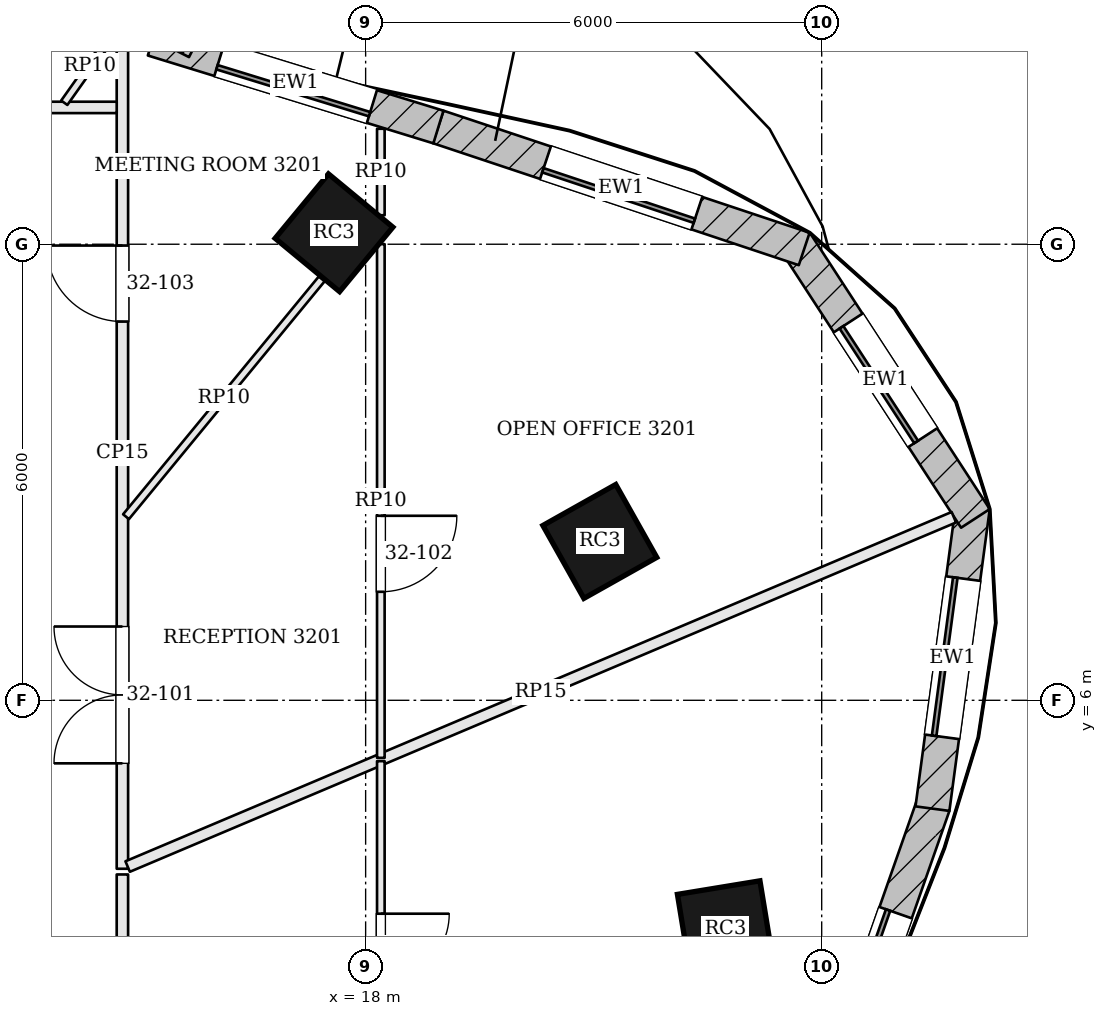
"""IFC4 building model, lengths in metres.
Left out: names, types, materials, properties, quantities, classifications, styles, units other than length and angle.
Written with IfcOpenShell. Run it as: python <this file> out.ifc"""

import sys

from ifc_helpers import new_model, si_unit, direction, frame, frame_2d, origin, origin_2d, place, context, subcontext, project, spatial, rectangle, extrude, element, fill, save


model = new_model("IFC4")
c1 = context("Model", 3, precision=1e-05, world=origin(), true_north=direction((0.0, 1.0)))
c2 = subcontext(c1, "Body", "Model", "MODEL_VIEW")
j1 = project(units=[si_unit("LENGTHUNIT", "METRE"), si_unit("PLANEANGLEUNIT", "RADIAN")], contexts=[c1])
p1 = place(None, origin())
s1 = spatial("IfcSite", under=j1, at=p1, CompositionType="ELEMENT")
p2 = place(p1, origin())
s2 = spatial("IfcBuilding", under=s1, at=p2, CompositionType="ELEMENT")
p3 = place(p2, frame((0.0, 0.0, 134.4)))
s3 = spatial("IfcBuildingStorey", under=s2, at=p3, CompositionType="ELEMENT", Elevation=134.4)
for number, where, z_axis, x_axis in (
    (1, (22.734, 2.993, 0.0), (0.0, 0.0, 1.0), (-0.162, 0.987, 0.0)),
    (2, (21.081, 8.09, 0.0), (0.0, 0.0, 1.0), (-0.49, 0.872, 0.0)),
    (3, (17.584, 12.151, 0.0), (0.0, 0.0, 1.0), (-0.771, 0.637, 0.0)),
):
    element("IfcColumn", number, at=place(p3, frame(where, z_axis=z_axis, x_axis=x_axis)), inside=s3, PredefinedType="COLUMN", context=c2, shape_type="SweptSolid", body=[
        extrude(rectangle(XDim=1.1, YDim=1.1, at=origin_2d()), origin(), (0.0, 0.0, 1.0), 3.9),
    ])
p4 = place(p3, frame((23.782, -0.189, 0.0), z_axis=(0.0, 0.0, 1.0), x_axis=(0.330794307703, 0.943702880144, 0.0)))
e4 = element("IfcWall", 4, at=p4, inside=s3, PredefinedType="SOLIDWALL", context=c2, shape_type="SweptSolid", body=[
    extrude(rectangle(XDim=5.095, YDim=0.45, at=frame_2d((2.548, 0.0))), origin(), (0.0, 0.0, 1.0), 3.7),
])
p5 = place(p4, frame((1.498, 0.0, 0.9)))
e5 = element("IfcOpeningElement", 5, at=p5, cuts=e4, PredefinedType="OPENING", context=c2, shape_type="SweptSolid", body=[
    extrude(rectangle(XDim=2.1, YDim=2.3, at=frame_2d((1.05, 1.15))), frame((0.0, 0.235, 0.0), z_axis=(0.0, -1.0, 0.0), x_axis=(1.0, 0.0, 0.0)), (0.0, 0.0, 1.0), 0.47),
])
p6 = place(p3, frame((25.457, 4.575, 0.0), z_axis=(0.0, 0.0, 1.0), x_axis=(0.132475046402, 0.991186340746, 0.0)))
e6 = element("IfcWall", 6, at=p6, inside=s3, PredefinedType="SOLIDWALL", context=c2, shape_type="SweptSolid", body=[
    extrude(rectangle(XDim=4.007, YDim=0.45, at=frame_2d((2.003, 0.0))), origin(), (0.0, 0.0, 1.0), 3.7),
])
p7 = place(p6, frame((0.953, 0.0, 0.9)))
e7 = element("IfcOpeningElement", 7, at=p7, cuts=e6, PredefinedType="OPENING", context=c2, shape_type="SweptSolid", body=[
    extrude(rectangle(XDim=2.1, YDim=2.3, at=frame_2d((1.05, 1.15))), frame((0.0, 0.235, 0.0), z_axis=(0.0, -1.0, 0.0), x_axis=(1.0, 0.0, 0.0)), (0.0, 0.0, 1.0), 0.47),
])
p8 = place(p3, frame((26.022, 8.393, 0.0), z_axis=(0.0, 0.0, 1.0), x_axis=(-0.545637310328, 0.838021435035, 0.0)))
e8 = element("IfcWall", 8, at=p8, inside=s3, PredefinedType="SOLIDWALL", context=c2, shape_type="SweptSolid", body=[
    extrude(rectangle(XDim=4.336, YDim=0.45, at=frame_2d((2.168, 0.0))), origin(), (0.0, 0.0, 1.0), 3.7),
])
p9 = place(p8, frame((1.268, 0.0, 0.9)))
e9 = element("IfcOpeningElement", 9, at=p9, cuts=e8, PredefinedType="OPENING", context=c2, shape_type="SweptSolid", body=[
    extrude(rectangle(XDim=1.8, YDim=2.3, at=frame_2d((0.9, 1.15))), frame((0.0, 0.235, 0.0), z_axis=(0.0, -1.0, 0.0), x_axis=(1.0, 0.0, 0.0)), (0.0, 0.0, 1.0), 0.47),
])
p10 = place(p3, frame((23.77, 11.938, 0.0), z_axis=(0.0, 0.0, 1.0), x_axis=(-0.948673679101, 0.316256621402, 0.0)))
e10 = element("IfcWall", 10, at=p10, inside=s3, PredefinedType="SOLIDWALL", context=c2, shape_type="SweptSolid", body=[
    extrude(rectangle(XDim=5.076, YDim=0.45, at=frame_2d((2.538, 0.0))), origin(), (0.0, 0.0, 1.0), 3.7),
])
p11 = place(p10, frame((1.488, 0.0, 0.9)))
e11 = element("IfcOpeningElement", 11, at=p11, cuts=e10, PredefinedType="OPENING", context=c2, shape_type="SweptSolid", body=[
    extrude(rectangle(XDim=2.1, YDim=2.3, at=frame_2d((1.05, 1.15))), frame((0.0, 0.235, 0.0), z_axis=(0.0, -1.0, 0.0), x_axis=(1.0, 0.0, 0.0)), (0.0, 0.0, 1.0), 0.47),
])
p12 = place(p3, frame((18.958, 13.542, 0.0), z_axis=(0.0, 0.0, 1.0), x_axis=(-0.955792437529, 0.294042201668, 0.0)))
e12 = element("IfcWall", 12, at=p12, inside=s3, PredefinedType="SOLIDWALL", context=c2, shape_type="SweptSolid", body=[
    extrude(rectangle(XDim=3.931, YDim=0.45, at=frame_2d((1.965, 0.0))), origin(), (0.0, 0.0, 1.0), 3.7),
])
p13 = place(p12, frame((0.915, 0.0, 0.9)))
e13 = element("IfcOpeningElement", 13, at=p13, cuts=e12, PredefinedType="OPENING", context=c2, shape_type="SweptSolid", body=[
    extrude(rectangle(XDim=2.1, YDim=2.3, at=frame_2d((1.05, 1.15))), frame((0.0, 0.235, 0.0), z_axis=(0.0, -1.0, 0.0), x_axis=(1.0, 0.0, 0.0)), (0.0, 0.0, 1.0), 0.47),
])
p14 = place(p3, frame((15.587, 14.507, 0.0), z_axis=(0.0, 0.0, 1.0), x_axis=(0.452117231361, 0.89195852432, 0.0)))
e14 = element("IfcWall", 14, at=p14, inside=s3, PredefinedType="SOLIDWALL", context=c2, shape_type="SweptSolid", body=[
    extrude(rectangle(XDim=1.75, YDim=0.2, at=frame_2d((0.875, 0.0))), origin(), (0.0, 0.0, 1.0), 3.7),
])
p15 = place(p3, frame((14.8, 3.784, 0.0), z_axis=(0.0, 0.0, 1.0), x_axis=(0.0, 1.0, 0.0)))
e15 = element("IfcWall", 15, at=p15, inside=s3, PredefinedType="PARTITIONING", context=c2, shape_type="SweptSolid", body=[
    extrude(rectangle(XDim=10.943, YDim=0.15, at=frame_2d((5.472, 0.0))), origin(), (0.0, 0.0, 1.0), 3.198),
])
p16 = place(p15, frame((1.387, 0.0, 0.0)))
e16 = element("IfcOpeningElement", 16, at=p16, cuts=e15, PredefinedType="OPENING", context=c2, shape_type="SweptSolid", body=[
    extrude(rectangle(XDim=1.8, YDim=2.1, at=frame_2d((0.9, 1.05))), frame((0.0, 0.085, 0.0), z_axis=(0.0, -1.0, 0.0), x_axis=(1.0, 0.0, 0.0)), (0.0, 0.0, 1.0), 0.17),
])
p17 = place(p15, frame((7.199, 0.0, 0.0)))
e17 = element("IfcOpeningElement", 17, at=p17, cuts=e15, PredefinedType="OPENING", context=c2, shape_type="SweptSolid", body=[
    extrude(rectangle(XDim=1.0, YDim=2.4, at=frame_2d((0.5, 1.2))), frame((0.0, 0.085, 0.0), z_axis=(0.0, -1.0, 0.0), x_axis=(1.0, 0.0, 0.0)), (0.0, 0.0, 1.0), 0.17),
])
p18 = place(p3, frame((14.725, 13.8, 0.0), z_axis=(0.0, 0.0, 1.0), x_axis=(-1.0, 0.0, 0.0)))
e18 = element("IfcWall", 18, at=p18, inside=s3, PredefinedType="PARTITIONING", context=c2, shape_type="SweptSolid", body=[
    extrude(rectangle(XDim=11.638, YDim=0.15, at=frame_2d((5.819, 0.0))), origin(), (0.0, 0.0, 1.0), 3.198),
])
p19 = place(p18, frame((2.95, 0.0, 0.0)))
e19 = element("IfcOpeningElement", 19, at=p19, cuts=e18, PredefinedType="OPENING", context=c2, shape_type="SweptSolid", body=[
    extrude(rectangle(XDim=1.0, YDim=2.1, at=frame_2d((0.5, 1.05))), frame((0.0, 0.085, 0.0), z_axis=(0.0, -1.0, 0.0), x_axis=(1.0, 0.0, 0.0)), (0.0, 0.0, 1.0), 0.17),
])
p20 = place(p18, frame((8.35, 0.0, 0.0)))
e20 = element("IfcOpeningElement", 20, at=p20, cuts=e18, PredefinedType="OPENING", context=c2, shape_type="SweptSolid", body=[
    extrude(rectangle(XDim=1.0, YDim=2.1, at=frame_2d((0.5, 1.05))), frame((0.0, 0.085, 0.0), z_axis=(0.0, -1.0, 0.0), x_axis=(1.0, 0.0, 0.0)), (0.0, 0.0, 1.0), 0.17),
])
p21 = place(p3, frame((25.739, 8.408, 0.0), z_axis=(0.0, 0.0, 1.0), x_axis=(-0.921062306608, -0.389415237692, 0.0)))
e21 = element("IfcWall", 21, at=p21, inside=s3, PredefinedType="PARTITIONING", context=c2, shape_type="SweptSolid", body=[
    extrude(rectangle(XDim=11.801, YDim=0.15, at=frame_2d((5.9, 0.0))), origin(), (0.0, 0.0, 1.0), 3.198),
])
p22 = place(p3, frame((14.8, -4.725, 0.0), z_axis=(0.0, 0.0, 1.0), x_axis=(0.0, 1.0, 0.0)))
e22 = element("IfcWall", 22, at=p22, inside=s3, PredefinedType="PARTITIONING", context=c2, shape_type="SweptSolid", body=[
    extrude(rectangle(XDim=8.434, YDim=0.15, at=frame_2d((4.217, 0.0))), origin(), (0.0, 0.0, 1.0), 3.198),
])
p23 = place(p22, frame((0.45, 0.0, 0.0)))
e23 = element("IfcOpeningElement", 23, at=p23, cuts=e22, PredefinedType="OPENING", context=c2, shape_type="SweptSolid", body=[
    extrude(rectangle(XDim=1.0, YDim=2.4, at=frame_2d((0.5, 1.2))), frame((0.0, 0.085, 0.0), z_axis=(0.0, -1.0, 0.0), x_axis=(1.0, 0.0, 0.0)), (0.0, 0.0, 1.0), 0.17),
])
p24 = place(p3, frame((18.2, 13.519, 0.0), z_axis=(0.0, 0.0, 1.0), x_axis=(0.0, -1.0, 0.0)))
e24 = element("IfcWall", 24, at=p24, inside=s3, PredefinedType="PARTITIONING", context=c2, shape_type="SweptSolid", body=[
    extrude(rectangle(XDim=1.138, YDim=0.1, at=frame_2d((0.569, 0.0))), origin(), (0.0, 0.0, 1.0), 3.184),
])
p25 = place(p3, frame((18.2, 12.001, 0.0), z_axis=(0.0, 0.0, 1.0), x_axis=(0.0, -1.0, 0.0)))
e25 = element("IfcWall", 25, at=p25, inside=s3, PredefinedType="PARTITIONING", context=c2, shape_type="SweptSolid", body=[
    extrude(rectangle(XDim=6.759, YDim=0.1, at=frame_2d((3.379, 0.0))), origin(), (0.0, 0.0, 1.0), 3.184),
])
p26 = place(p25, frame((3.574, 0.0, 0.0)))
e26 = element("IfcOpeningElement", 26, at=p26, cuts=e25, PredefinedType="OPENING", context=c2, shape_type="SweptSolid", body=[
    extrude(rectangle(XDim=1.0, YDim=2.1, at=frame_2d((0.5, 1.05))), frame((0.0, 0.06, 0.0), z_axis=(0.0, -1.0, 0.0), x_axis=(1.0, 0.0, 0.0)), (0.0, 0.0, 1.0), 0.12),
])
p27 = place(p3, frame((14.848, 8.415, 0.0), z_axis=(0.0, 0.0, 1.0), x_axis=(0.63542004032, 0.77216667395, 0.0)))
e27 = element("IfcWall", 27, at=p27, inside=s3, PredefinedType="PARTITIONING", context=c2, shape_type="SweptSolid", body=[
    extrude(rectangle(XDim=4.053, YDim=0.1, at=frame_2d((2.026, 0.0))), origin(), (0.0, 0.0, 1.0), 3.184),
])
p28 = place(p3, frame((14.035, 13.861, 0.0), z_axis=(0.0, 0.0, 1.0), x_axis=(0.57745118401, 0.816425214019, 0.0)))
e28 = element("IfcWall", 28, at=p28, inside=s3, PredefinedType="PARTITIONING", context=c2, shape_type="SweptSolid", body=[
    extrude(rectangle(XDim=1.173, YDim=0.1, at=frame_2d((0.586, 0.0))), origin(), (0.0, 0.0, 1.0), 3.184),
])
p29 = place(p3, frame((18.2, 5.199, 0.0), z_axis=(0.0, 0.0, 1.0), x_axis=(0.0, -1.0, 0.0)))
e29 = element("IfcWall", 29, at=p29, inside=s3, PredefinedType="PARTITIONING", context=c2, shape_type="SweptSolid", body=[
    extrude(rectangle(XDim=13.399, YDim=0.1, at=frame_2d((6.7, 0.0))), origin(), (0.0, 0.0, 1.0), 3.184),
])
p30 = place(p29, frame((6.227, 0.0, 0.0)))
e30 = element("IfcOpeningElement", 30, at=p30, cuts=e29, PredefinedType="OPENING", context=c2, shape_type="SweptSolid", body=[
    extrude(rectangle(XDim=0.9, YDim=2.1, at=frame_2d((0.45, 1.05))), frame((0.0, 0.06, 0.0), z_axis=(0.0, -1.0, 0.0), x_axis=(1.0, 0.0, 0.0)), (0.0, 0.0, 1.0), 0.12),
])
p31 = place(p29, frame((2.007, 0.0, 0.0)))
e31 = element("IfcOpeningElement", 31, at=p31, cuts=e29, PredefinedType="OPENING", context=c2, shape_type="SweptSolid", body=[
    extrude(rectangle(XDim=0.9, YDim=2.1, at=frame_2d((0.45, 1.05))), frame((0.0, 0.06, 0.0), z_axis=(0.0, -1.0, 0.0), x_axis=(1.0, 0.0, 0.0)), (0.0, 0.0, 1.0), 0.12),
])
p32 = place(p5, origin())
e32 = element("IfcWindow", 32, at=p32, inside=s3, PartitioningType="SINGLE_PANEL", PredefinedType="WINDOW", context=c2, shape_type="SweptSolid", body=[
    extrude(rectangle(XDim=2.1, YDim=2.3, at=frame_2d((1.05, 1.15))), frame((0.0, 0.135, 0.0), z_axis=(0.0, -1.0, 0.0), x_axis=(1.0, 0.0, 0.0)), (0.0, 0.0, 1.0), 0.06),
])
fill(e5, e32)
p33 = place(p7, origin())
e33 = element("IfcWindow", 33, at=p33, inside=s3, PartitioningType="SINGLE_PANEL", PredefinedType="WINDOW", context=c2, shape_type="SweptSolid", body=[
    extrude(rectangle(XDim=2.1, YDim=2.3, at=frame_2d((1.05, 1.15))), frame((0.0, 0.135, 0.0), z_axis=(0.0, -1.0, 0.0), x_axis=(1.0, 0.0, 0.0)), (0.0, 0.0, 1.0), 0.06),
])
fill(e7, e33)
p34 = place(p9, origin())
e34 = element("IfcWindow", 34, at=p34, inside=s3, PartitioningType="SINGLE_PANEL", PredefinedType="WINDOW", context=c2, shape_type="SweptSolid", body=[
    extrude(rectangle(XDim=1.8, YDim=2.3, at=frame_2d((0.9, 1.15))), frame((0.0, 0.135, 0.0), z_axis=(0.0, -1.0, 0.0), x_axis=(1.0, 0.0, 0.0)), (0.0, 0.0, 1.0), 0.06),
])
fill(e9, e34)
p35 = place(p11, origin())
e35 = element("IfcWindow", 35, at=p35, inside=s3, PartitioningType="SINGLE_PANEL", PredefinedType="WINDOW", context=c2, shape_type="SweptSolid", body=[
    extrude(rectangle(XDim=2.1, YDim=2.3, at=frame_2d((1.05, 1.15))), frame((0.0, 0.135, 0.0), z_axis=(0.0, -1.0, 0.0), x_axis=(1.0, 0.0, 0.0)), (0.0, 0.0, 1.0), 0.06),
])
fill(e11, e35)
p36 = place(p13, origin())
e36 = element("IfcWindow", 36, at=p36, inside=s3, PartitioningType="SINGLE_PANEL", PredefinedType="WINDOW", context=c2, shape_type="SweptSolid", body=[
    extrude(rectangle(XDim=2.1, YDim=2.3, at=frame_2d((1.05, 1.15))), frame((0.0, 0.135, 0.0), z_axis=(0.0, -1.0, 0.0), x_axis=(1.0, 0.0, 0.0)), (0.0, 0.0, 1.0), 0.06),
])
fill(e13, e36)
p37 = place(p16, origin())
e37 = element("IfcDoor", 37, at=p37, inside=s3, OperationType="DOUBLE_DOOR_SINGLE_SWING", PredefinedType="DOOR", context=c2, shape_type="SweptSolid", body=[
    extrude(rectangle(XDim=1.8, YDim=2.1, at=frame_2d((0.9, 1.05))), frame((0.0, 0.025, 0.0), z_axis=(0.0, -1.0, 0.0), x_axis=(1.0, 0.0, 0.0)), (0.0, 0.0, 1.0), 0.05),
])
fill(e16, e37)
p38 = place(p26, origin())
e38 = element("IfcDoor", 38, at=p38, inside=s3, OperationType="SINGLE_SWING_LEFT", PredefinedType="DOOR", context=c2, shape_type="SweptSolid", body=[
    extrude(rectangle(XDim=1.0, YDim=2.1, at=frame_2d((0.5, 1.05))), frame((0.0, 0.025, 0.0), z_axis=(0.0, -1.0, 0.0), x_axis=(1.0, 0.0, 0.0)), (0.0, 0.0, 1.0), 0.05),
])
fill(e26, e38)
p39 = place(p17, origin())
e39 = element("IfcDoor", 39, at=p39, inside=s3, OperationType="SINGLE_SWING_RIGHT", PredefinedType="DOOR", context=c2, shape_type="SweptSolid", body=[
    extrude(rectangle(XDim=1.0, YDim=2.4, at=frame_2d((0.5, 1.2))), frame((0.0, 0.025, 0.0), z_axis=(0.0, -1.0, 0.0), x_axis=(1.0, 0.0, 0.0)), (0.0, 0.0, 1.0), 0.05),
])
fill(e17, e39)
p40 = place(p31, origin())
e40 = element("IfcDoor", 40, at=p40, inside=s3, OperationType="SINGLE_SWING_LEFT", PredefinedType="DOOR", context=c2, shape_type="SweptSolid", body=[
    extrude(rectangle(XDim=0.9, YDim=2.1, at=frame_2d((0.45, 1.05))), frame((0.0, 0.025, 0.0), z_axis=(0.0, -1.0, 0.0), x_axis=(1.0, 0.0, 0.0)), (0.0, 0.0, 1.0), 0.05),
])
fill(e31, e40)
save(model, sys.argv[1])
